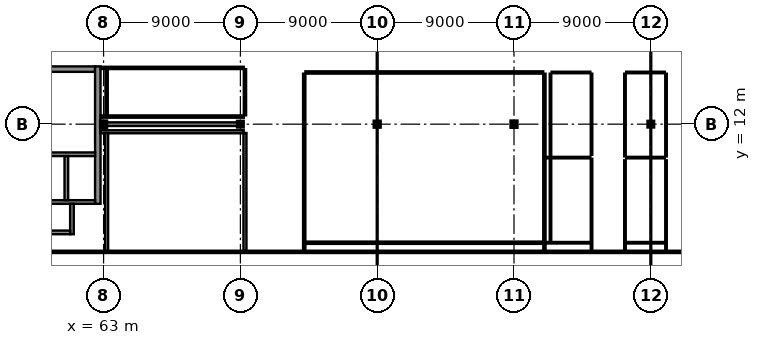
"""IFC4 building model, lengths in metres.
Left out: names, types, materials, properties, quantities, classifications, styles, units other than length and angle.
Written with IfcOpenShell. Run it as: python <this file> out.ifc"""

import sys

from ifc_helpers import new_model, si_unit, direction, frame, frame_2d, origin, origin_2d, place, context, subcontext, project, spatial, rectangle, i_section, extrude, element, fill, save


model = new_model("IFC4")
c1 = context("Model", 3, precision=1e-05, world=origin(), true_north=direction((0.0, 1.0)))
c2 = subcontext(c1, "Body", "Model", "MODEL_VIEW")
j1 = project(units=[si_unit("LENGTHUNIT", "METRE"), si_unit("PLANEANGLEUNIT", "RADIAN")], contexts=[c1])
p1 = place(None, origin())
s1 = spatial("IfcSite", under=j1, at=p1, CompositionType="ELEMENT")
p2 = place(p1, origin())
s2 = spatial("IfcBuilding", under=s1, at=p2, CompositionType="ELEMENT")
p3 = place(p2, frame((0.0, 0.0, 27.4)))
s3 = spatial("IfcBuildingStorey", under=s2, at=p3, CompositionType="ELEMENT", Elevation=27.4)
p4 = place(p3, frame((63.0, 12.0, 0.0), z_axis=(0.0, 0.0, 1.0), x_axis=(1.0, 0.0, 0.0)))
e1 = element("IfcColumn", 1, at=p4, inside=s3, PredefinedType="COLUMN", context=c2, shape_type="SweptSolid", body=[
    extrude(i_section(OverallWidth=0.3, OverallDepth=0.32, WebThickness=0.011, FlangeThickness=0.021, at=origin_2d()), origin(), (0.0, 0.0, 1.0), 4.0),
])
p5 = place(p3, frame((72.0, 12.0, 0.0), z_axis=(0.0, 0.0, 1.0), x_axis=(0.0, 1.0, 0.0)))
e2 = element("IfcColumn", 2, at=p5, inside=s3, PredefinedType="COLUMN", context=c2, shape_type="SweptSolid", body=[
    extrude(i_section(OverallWidth=0.28, OverallDepth=0.28, WebThickness=0.01, FlangeThickness=0.018, at=origin_2d()), origin(), (0.0, 0.0, 1.0), 4.0),
])
p6 = place(p3, frame((81.0, 12.0, 0.0), z_axis=(0.0, 0.0, 1.0), x_axis=(1.0, 0.0, 0.0)))
e3 = element("IfcColumn", 3, at=p6, inside=s3, PredefinedType="COLUMN", context=c2, shape_type="SweptSolid", body=[
    extrude(i_section(OverallWidth=0.3, OverallDepth=0.3, WebThickness=0.011, FlangeThickness=0.019, at=origin_2d()), origin(), (0.0, 0.0, 1.0), 4.0),
])
p7 = place(p3, frame((90.0, 12.0, 0.0), z_axis=(0.0, 0.0, 1.0), x_axis=(1.0, 0.0, 0.0)))
e4 = element("IfcColumn", 4, at=p7, inside=s3, PredefinedType="COLUMN", context=c2, shape_type="SweptSolid", body=[
    extrude(i_section(OverallWidth=0.3, OverallDepth=0.32, WebThickness=0.011, FlangeThickness=0.021, at=origin_2d()), origin(), (0.0, 0.0, 1.0), 4.0),
])
p8 = place(p3, frame((99.0, 12.0, 0.0), z_axis=(0.0, 0.0, 1.0), x_axis=(1.0, 0.0, 0.0)))
e5 = element("IfcColumn", 5, at=p8, inside=s3, PredefinedType="COLUMN", context=c2, shape_type="SweptSolid", body=[
    extrude(i_section(OverallWidth=0.28, OverallDepth=0.28, WebThickness=0.01, FlangeThickness=0.018, at=origin_2d()), origin(), (0.0, 0.0, 1.0), 4.0),
])
p9 = place(p3, frame((58.54, 15.62, 0.0), z_axis=(0.0, 0.0, 1.0), x_axis=(1.0, 0.0, 0.0)))
e6 = element("IfcWall", 6, at=p9, inside=s3, PredefinedType="SHEAR", context=c2, shape_type="SweptSolid", body=[
    extrude(rectangle(XDim=3.9, YDim=0.36, at=frame_2d((1.95, 0.0))), origin(), (0.0, 0.0, 1.0), 3.66),
])
p10 = place(p9, frame((1.15, 0.0, 0.0)))
e7 = element("IfcOpeningElement", 7, at=p10, cuts=e6, PredefinedType="OPENING", context=c2, shape_type="SweptSolid", body=[
    extrude(rectangle(XDim=1.6, YDim=2.25, at=frame_2d((0.8, 1.125))), frame((0.0, 0.195, 0.0), z_axis=(0.0, -1.0, 0.0), x_axis=(1.0, 0.0, 0.0)), (0.0, 0.0, 1.0), 0.39),
])
p11 = place(p3, frame((62.62, 6.76, 0.0), z_axis=(0.0, 0.0, 1.0), x_axis=(0.0, 1.0, 0.0)))
e8 = element("IfcWall", 8, at=p11, inside=s3, PredefinedType="SHEAR", context=c2, shape_type="SweptSolid", body=[
    extrude(rectangle(XDim=9.04, YDim=0.36, at=frame_2d((4.52, 0.0))), origin(), (0.0, 0.0, 1.0), 3.66),
])
p12 = place(p3, frame((58.54, 10.02, 0.0), z_axis=(0.0, 0.0, 1.0), x_axis=(1.0, 0.0, 0.0)))
e9 = element("IfcWall", 9, at=p12, inside=s3, PredefinedType="SHEAR", context=c2, shape_type="SweptSolid", body=[
    extrude(rectangle(XDim=3.9, YDim=0.24, at=frame_2d((1.95, 0.0))), origin(), (0.0, 0.0, 1.0), 3.81),
])
p13 = place(p12, frame((0.235, 0.0, 0.0)))
e10 = element("IfcOpeningElement", 10, at=p13, cuts=e9, PredefinedType="OPENING", context=c2, shape_type="SweptSolid", body=[
    extrude(rectangle(XDim=1.6, YDim=2.3, at=frame_2d((0.8, 1.15))), frame((0.0, 0.135, 0.0), z_axis=(0.0, -1.0, 0.0), x_axis=(1.0, 0.0, 0.0)), (0.0, 0.0, 1.0), 0.27),
])
p14 = place(p12, frame((2.185, 0.0, 0.0)))
e11 = element("IfcOpeningElement", 11, at=p14, cuts=e9, PredefinedType="OPENING", context=c2, shape_type="SweptSolid", body=[
    extrude(rectangle(XDim=1.6, YDim=2.3, at=frame_2d((0.8, 1.15))), frame((0.0, 0.135, 0.0), z_axis=(0.0, -1.0, 0.0), x_axis=(1.0, 0.0, 0.0)), (0.0, 0.0, 1.0), 0.27),
])
p15 = place(p3, frame((58.54, 6.88, 0.0), z_axis=(0.0, 0.0, 1.0), x_axis=(1.0, 0.0, 0.0)))
e12 = element("IfcWall", 12, at=p15, inside=s3, PredefinedType="SHEAR", context=c2, shape_type="SweptSolid", body=[
    extrude(rectangle(XDim=3.9, YDim=0.24, at=frame_2d((1.95, 0.0))), origin(), (0.0, 0.0, 1.0), 3.81),
])
p16 = place(p3, frame((60.55, 7.0, 0.0), z_axis=(0.0, 0.0, 1.0), x_axis=(0.0, 1.0, 0.0)))
e13 = element("IfcWall", 13, at=p16, inside=s3, PredefinedType="SHEAR", context=c2, shape_type="SweptSolid", body=[
    extrude(rectangle(XDim=2.9, YDim=0.24, at=frame_2d((1.45, 0.0))), origin(), (0.0, 0.0, 1.0), 3.81),
])
p17 = place(p3, frame((60.92, 4.76, 0.0), z_axis=(0.0, 0.0, 1.0), x_axis=(0.0, 1.0, 0.0)))
e14 = element("IfcWall", 14, at=p17, inside=s3, PredefinedType="SHEAR", context=c2, shape_type="SweptSolid", body=[
    extrude(rectangle(XDim=2.0, YDim=0.24, at=frame_2d((1.0, 0.0))), origin(), (0.0, 0.0, 1.0), 3.81),
])
p18 = place(p3, frame((58.54, 4.88, 0.0), z_axis=(0.0, 0.0, 1.0), x_axis=(1.0, 0.0, 0.0)))
e15 = element("IfcWall", 15, at=p18, inside=s3, PredefinedType="SHEAR", context=c2, shape_type="SweptSolid", body=[
    extrude(rectangle(XDim=2.26, YDim=0.24, at=frame_2d((1.13, 0.0))), origin(), (0.0, 0.0, 1.0), 3.81),
])
p19 = place(p3, frame((63.008, 12.0, 0.0), z_axis=(0.0, 0.0, 1.0), x_axis=(1.0, 0.0, 0.0)))
e16 = element("IfcWall", 16, at=p19, inside=s3, PredefinedType="SHEAR", context=c2, shape_type="SweptSolid", body=[
    extrude(rectangle(XDim=8.854, YDim=0.24, at=frame_2d((4.427, 0.0))), origin(), (0.0, 0.0, 1.0), 3.355),
])
p20 = place(p3, frame((45.88, 3.6, 0.0), z_axis=(0.0, 0.0, 1.0), x_axis=(1.0, 0.0, 0.0)))
e17 = element("IfcWall", 17, at=p20, inside=s3, PredefinedType="PARTITIONING", context=c2, shape_type="SweptSolid", body=[
    extrude(rectangle(XDim=58.24, YDim=0.15, at=frame_2d((29.12, 0.0))), origin(), (0.0, 0.0, 1.0), 3.64),
])
p21 = place(p20, frame((27.795, 0.0, 0.0)))
e18 = element("IfcOpeningElement", 18, at=p21, cuts=e17, PredefinedType="OPENING", context=c2, shape_type="SweptSolid", body=[
    extrude(rectangle(XDim=1.05, YDim=2.25, at=frame_2d((0.525, 1.125))), frame((0.0, 0.09, 0.0), z_axis=(0.0, -1.0, 0.0), x_axis=(1.0, 0.0, 0.0)), (0.0, 0.0, 1.0), 0.18),
])
p22 = place(p3, frame((62.795, 11.5, 0.0), z_axis=(0.0, 0.0, 1.0), x_axis=(1.0, 0.0, 0.0)))
e19 = element("IfcWall", 19, at=p22, inside=s3, PredefinedType="PARTITIONING", context=c2, shape_type="SweptSolid", body=[
    extrude(rectangle(XDim=9.425, YDim=0.2, at=frame_2d((4.712, 0.0))), origin(), (0.0, 0.0, 1.0), 3.64),
])
p23 = place(p3, frame((72.3, 11.42, 0.0), z_axis=(0.0, 0.0, 1.0), x_axis=(0.0, -1.0, 0.0)))
e20 = element("IfcWall", 20, at=p23, inside=s3, PredefinedType="PARTITIONING", context=c2, shape_type="SweptSolid", body=[
    extrude(rectangle(XDim=7.75, YDim=0.2, at=frame_2d((3.875, 0.0))), origin(), (0.0, 0.0, 1.0), 3.64),
])
p24 = place(p23, frame((3.025, 0.0, 0.0)))
e21 = element("IfcOpeningElement", 21, at=p24, cuts=e20, PredefinedType="OPENING", context=c2, shape_type="SweptSolid", body=[
    extrude(rectangle(XDim=1.7, YDim=2.4, at=frame_2d((0.85, 1.2))), frame((0.0, 0.115, 0.0), z_axis=(0.0, -1.0, 0.0), x_axis=(1.0, 0.0, 0.0)), (0.0, 0.0, 1.0), 0.23),
])
p25 = place(p3, frame((63.2, 3.67, 0.0), z_axis=(0.0, 0.0, 1.0), x_axis=(0.0, 1.0, 0.0)))
e22 = element("IfcWall", 22, at=p25, inside=s3, PredefinedType="PARTITIONING", context=c2, shape_type="SweptSolid", body=[
    extrude(rectangle(XDim=7.75, YDim=0.2, at=frame_2d((3.875, 0.0))), origin(), (0.0, 0.0, 1.0), 3.355),
])
p26 = place(p3, frame((72.22, 12.5, 0.0), z_axis=(0.0, 0.0, 1.0), x_axis=(-1.0, 0.0, 0.0)))
e23 = element("IfcWall", 23, at=p26, inside=s3, PredefinedType="PARTITIONING", context=c2, shape_type="SweptSolid", body=[
    extrude(rectangle(XDim=9.425, YDim=0.15, at=frame_2d((4.712, 0.0))), origin(), (0.0, 0.0, 1.0), 3.64),
])
p27 = place(p3, frame((63.2, 12.57, 0.0), z_axis=(0.0, 0.0, 1.0), x_axis=(0.0, 1.0, 0.0)))
e24 = element("IfcWall", 24, at=p27, inside=s3, PredefinedType="PARTITIONING", context=c2, shape_type="SweptSolid", body=[
    extrude(rectangle(XDim=3.05, YDim=0.15, at=frame_2d((1.525, 0.0))), origin(), (0.0, 0.0, 1.0), 3.355),
])
p28 = place(p3, frame((62.795, 15.7, 0.0), z_axis=(0.0, 0.0, 1.0), x_axis=(1.0, 0.0, 0.0)))
e25 = element("IfcWall", 25, at=p28, inside=s3, PredefinedType="PARTITIONING", context=c2, shape_type="SweptSolid", body=[
    extrude(rectangle(XDim=9.425, YDim=0.15, at=frame_2d((4.712, 0.0))), origin(), (0.0, 0.0, 1.0), 3.64),
])
p29 = place(p28, frame((4.187, 0.0, 0.0)))
e26 = element("IfcOpeningElement", 26, at=p29, cuts=e25, PredefinedType="OPENING", context=c2, shape_type="SweptSolid", body=[
    extrude(rectangle(XDim=1.05, YDim=2.25, at=frame_2d((0.525, 1.125))), frame((0.0, 0.09, 0.0), z_axis=(0.0, -1.0, 0.0), x_axis=(1.0, 0.0, 0.0)), (0.0, 0.0, 1.0), 0.18),
])
p30 = place(p3, frame((72.3, 15.62, 0.0), z_axis=(0.0, 0.0, 1.0), x_axis=(0.0, -1.0, 0.0)))
e27 = element("IfcWall", 27, at=p30, inside=s3, PredefinedType="PARTITIONING", context=c2, shape_type="SweptSolid", body=[
    extrude(rectangle(XDim=3.04, YDim=0.15, at=frame_2d((1.52, 0.0))), origin(), (0.0, 0.0, 1.0), 3.64),
])
p31 = place(p3, frame((76.2, 3.67, 0.0), z_axis=(0.0, 0.0, 1.0), x_axis=(0.0, 1.0, 0.0)))
e28 = element("IfcWall", 28, at=p31, inside=s3, PredefinedType="PARTITIONING", context=c2, shape_type="SweptSolid", body=[
    extrude(rectangle(XDim=11.65, YDim=0.15, at=frame_2d((5.825, 0.0))), origin(), (0.0, 0.0, 1.0), 3.64),
])
p32 = place(p3, frame((76.28, 15.4, 0.0), z_axis=(0.0, 0.0, 1.0), x_axis=(1.0, 0.0, 0.0)))
e29 = element("IfcWall", 29, at=p32, inside=s3, PredefinedType="PARTITIONING", context=c2, shape_type="SweptSolid", body=[
    extrude(rectangle(XDim=15.64, YDim=0.15, at=frame_2d((7.82, 0.0))), origin(), (0.0, 0.0, 1.0), 3.64),
])
p33 = place(p32, frame((7.295, 0.0, 0.0)))
e30 = element("IfcOpeningElement", 30, at=p33, cuts=e29, PredefinedType="OPENING", context=c2, shape_type="SweptSolid", body=[
    extrude(rectangle(XDim=1.05, YDim=2.25, at=frame_2d((0.525, 1.125))), frame((0.0, 0.09, 0.0), z_axis=(0.0, -1.0, 0.0), x_axis=(1.0, 0.0, 0.0)), (0.0, 0.0, 1.0), 0.18),
])
p34 = place(p3, frame((92.0, 15.32, 0.0), z_axis=(0.0, 0.0, 1.0), x_axis=(0.0, -1.0, 0.0)))
e31 = element("IfcWall", 31, at=p34, inside=s3, PredefinedType="PARTITIONING", context=c2, shape_type="SweptSolid", body=[
    extrude(rectangle(XDim=11.65, YDim=0.15, at=frame_2d((5.825, 0.0))), origin(), (0.0, 0.0, 1.0), 3.64),
])
p35 = place(p3, frame((91.93, 4.2, 0.0), z_axis=(0.0, 0.0, 1.0), x_axis=(-1.0, 0.0, 0.0)))
e32 = element("IfcWall", 32, at=p35, inside=s3, PredefinedType="PARTITIONING", context=c2, shape_type="SweptSolid", body=[
    extrude(rectangle(XDim=15.66, YDim=0.15, at=frame_2d((7.83, 0.0))), origin(), (0.0, 0.0, 1.0), 3.64),
])
p36 = place(p3, frame((95.1, 9.72, 0.0), z_axis=(0.0, 0.0, 1.0), x_axis=(0.0, -1.0, 0.0)))
e33 = element("IfcWall", 33, at=p36, inside=s3, PredefinedType="PARTITIONING", context=c2, shape_type="SweptSolid", body=[
    extrude(rectangle(XDim=6.05, YDim=0.1, at=frame_2d((3.025, 0.0))), origin(), (0.0, 0.0, 1.0), 3.64),
])
p37 = place(p36, frame((2.529, 0.0, 0.0)))
e34 = element("IfcOpeningElement", 34, at=p37, cuts=e33, PredefinedType="OPENING", context=c2, shape_type="SweptSolid", body=[
    extrude(rectangle(XDim=0.9, YDim=2.05, at=frame_2d((0.45, 1.025))), frame((0.0, 0.065, 0.0), z_axis=(0.0, -1.0, 0.0), x_axis=(1.0, 0.0, 0.0)), (0.0, 0.0, 1.0), 0.13),
])
p38 = place(p3, frame((95.055, 4.2, 0.0), z_axis=(0.0, 0.0, 1.0), x_axis=(-1.0, 0.0, 0.0)))
e35 = element("IfcWall", 35, at=p38, inside=s3, PredefinedType="PARTITIONING", context=c2, shape_type="SweptSolid", body=[
    extrude(rectangle(XDim=2.985, YDim=0.1, at=frame_2d((1.492, 0.0))), origin(), (0.0, 0.0, 1.0), 3.64),
])
p39 = place(p3, frame((92.4, 4.245, 0.0), z_axis=(0.0, 0.0, 1.0), x_axis=(0.0, 1.0, 0.0)))
e36 = element("IfcWall", 36, at=p39, inside=s3, PredefinedType="PARTITIONING", context=c2, shape_type="SweptSolid", body=[
    extrude(rectangle(XDim=5.475, YDim=0.1, at=frame_2d((2.737, 0.0))), origin(), (0.0, 0.0, 1.0), 3.64),
])
p40 = place(p3, frame((92.07, 9.8, 0.0), z_axis=(0.0, 0.0, 1.0), x_axis=(1.0, 0.0, 0.0)))
e37 = element("IfcWall", 37, at=p40, inside=s3, PredefinedType="PARTITIONING", context=c2, shape_type="SweptSolid", body=[
    extrude(rectangle(XDim=2.95, YDim=0.1, at=frame_2d((1.475, 0.0))), origin(), (0.0, 0.0, 1.0), 3.64),
])
p41 = place(p3, frame((92.4, 9.845, 0.0), z_axis=(0.0, 0.0, 1.0), x_axis=(0.0, 1.0, 0.0)))
e38 = element("IfcWall", 38, at=p41, inside=s3, PredefinedType="PARTITIONING", context=c2, shape_type="SweptSolid", body=[
    extrude(rectangle(XDim=5.475, YDim=0.1, at=frame_2d((2.738, 0.0))), origin(), (0.0, 0.0, 1.0), 3.64),
])
p42 = place(p3, frame((92.48, 15.4, 0.0), z_axis=(0.0, 0.0, 1.0), x_axis=(1.0, 0.0, 0.0)))
e39 = element("IfcWall", 39, at=p42, inside=s3, PredefinedType="PARTITIONING", context=c2, shape_type="SweptSolid", body=[
    extrude(rectangle(XDim=2.54, YDim=0.1, at=frame_2d((1.27, 0.0))), origin(), (0.0, 0.0, 1.0), 3.64),
])
p43 = place(p3, frame((95.1, 15.32, 0.0), z_axis=(0.0, 0.0, 1.0), x_axis=(0.0, -1.0, 0.0)))
e40 = element("IfcWall", 40, at=p43, inside=s3, PredefinedType="PARTITIONING", context=c2, shape_type="SweptSolid", body=[
    extrude(rectangle(XDim=5.34, YDim=0.1, at=frame_2d((2.67, 0.0))), origin(), (0.0, 0.0, 1.0), 3.64),
])
p44 = place(p43, frame((2.22, 0.0, 0.0)))
e41 = element("IfcOpeningElement", 41, at=p44, cuts=e40, PredefinedType="OPENING", context=c2, shape_type="SweptSolid", body=[
    extrude(rectangle(XDim=0.9, YDim=2.05, at=frame_2d((0.45, 1.025))), frame((0.0, 0.065, 0.0), z_axis=(0.0, -1.0, 0.0), x_axis=(1.0, 0.0, 0.0)), (0.0, 0.0, 1.0), 0.13),
])
p45 = place(p3, frame((97.3, 9.88, 0.0), z_axis=(0.0, 0.0, 1.0), x_axis=(0.0, 1.0, 0.0)))
e42 = element("IfcWall", 42, at=p45, inside=s3, PredefinedType="PARTITIONING", context=c2, shape_type="SweptSolid", body=[
    extrude(rectangle(XDim=5.44, YDim=0.1, at=frame_2d((2.72, 0.0))), origin(), (0.0, 0.0, 1.0), 3.64),
])
p46 = place(p45, frame((2.22, 0.0, 0.0)))
e43 = element("IfcOpeningElement", 43, at=p46, cuts=e42, PredefinedType="OPENING", context=c2, shape_type="SweptSolid", body=[
    extrude(rectangle(XDim=1.0, YDim=2.1, at=frame_2d((0.5, 1.05))), frame((0.0, 0.065, 0.0), z_axis=(0.0, -1.0, 0.0), x_axis=(1.0, 0.0, 0.0)), (0.0, 0.0, 1.0), 0.13),
])
p47 = place(p3, frame((97.38, 15.4, 0.0), z_axis=(0.0, 0.0, 1.0), x_axis=(1.0, 0.0, 0.0)))
e44 = element("IfcWall", 44, at=p47, inside=s3, PredefinedType="PARTITIONING", context=c2, shape_type="SweptSolid", body=[
    extrude(rectangle(XDim=2.54, YDim=0.1, at=frame_2d((1.27, 0.0))), origin(), (0.0, 0.0, 1.0), 3.64),
])
p48 = place(p3, frame((100.0, 15.32, 0.0), z_axis=(0.0, 0.0, 1.0), x_axis=(0.0, -1.0, 0.0)))
e45 = element("IfcWall", 45, at=p48, inside=s3, PredefinedType="PARTITIONING", context=c2, shape_type="SweptSolid", body=[
    extrude(rectangle(XDim=5.44, YDim=0.1, at=frame_2d((2.72, 0.0))), origin(), (0.0, 0.0, 1.0), 3.64),
])
p49 = place(p3, frame((99.92, 9.8, 0.0), z_axis=(0.0, 0.0, 1.0), x_axis=(-1.0, 0.0, 0.0)))
e46 = element("IfcWall", 46, at=p49, inside=s3, PredefinedType="PARTITIONING", context=c2, shape_type="SweptSolid", body=[
    extrude(rectangle(XDim=2.54, YDim=0.1, at=frame_2d((1.27, 0.0))), origin(), (0.0, 0.0, 1.0), 3.64),
])
p50 = place(p3, frame((100.0, 9.62, 0.0), z_axis=(0.0, 0.0, 1.0), x_axis=(0.0, -1.0, 0.0)))
e47 = element("IfcWall", 47, at=p50, inside=s3, PredefinedType="PARTITIONING", context=c2, shape_type="SweptSolid", body=[
    extrude(rectangle(XDim=5.95, YDim=0.1, at=frame_2d((2.975, 0.0))), origin(), (0.0, 0.0, 1.0), 3.64),
])
p51 = place(p3, frame((99.955, 4.2, 0.0), z_axis=(0.0, 0.0, 1.0), x_axis=(-1.0, 0.0, 0.0)))
e48 = element("IfcWall", 48, at=p51, inside=s3, PredefinedType="PARTITIONING", context=c2, shape_type="SweptSolid", body=[
    extrude(rectangle(XDim=2.575, YDim=0.1, at=frame_2d((1.288, 0.0))), origin(), (0.0, 0.0, 1.0), 3.64),
])
p52 = place(p3, frame((97.3, 3.67, 0.0), z_axis=(0.0, 0.0, 1.0), x_axis=(0.0, 1.0, 0.0)))
e49 = element("IfcWall", 49, at=p52, inside=s3, PredefinedType="PARTITIONING", context=c2, shape_type="SweptSolid", body=[
    extrude(rectangle(XDim=5.95, YDim=0.1, at=frame_2d((2.975, 0.0))), origin(), (0.0, 0.0, 1.0), 3.64),
])
p53 = place(p52, frame((2.571, 0.0, 0.0)))
e50 = element("IfcOpeningElement", 50, at=p53, cuts=e49, PredefinedType="OPENING", context=c2, shape_type="SweptSolid", body=[
    extrude(rectangle(XDim=0.9, YDim=2.05, at=frame_2d((0.45, 1.025))), frame((0.0, 0.065, 0.0), z_axis=(0.0, -1.0, 0.0), x_axis=(1.0, 0.0, 0.0)), (0.0, 0.0, 1.0), 0.13),
])
p54 = place(p10, origin())
e51 = element("IfcDoor", 51, at=p54, inside=s3, OperationType="DOUBLE_DOOR_SINGLE_SWING", PredefinedType="DOOR", context=c2, shape_type="SweptSolid", body=[
    extrude(rectangle(XDim=1.6, YDim=2.25, at=frame_2d((0.8, 1.125))), frame((0.0, 0.025, 0.0), z_axis=(0.0, -1.0, 0.0), x_axis=(1.0, 0.0, 0.0)), (0.0, 0.0, 1.0), 0.05),
])
fill(e7, e51)
p55 = place(p13, origin())
e52 = element("IfcDoor", 52, at=p55, inside=s3, OperationType="DOUBLE_DOOR_SLIDING", PredefinedType="DOOR", context=c2, shape_type="SweptSolid", body=[
    extrude(rectangle(XDim=1.6, YDim=2.3, at=frame_2d((0.8, 1.15))), frame((0.0, 0.025, 0.0), z_axis=(0.0, -1.0, 0.0), x_axis=(1.0, 0.0, 0.0)), (0.0, 0.0, 1.0), 0.05),
])
fill(e10, e52)
p56 = place(p14, origin())
e53 = element("IfcDoor", 53, at=p56, inside=s3, OperationType="DOUBLE_DOOR_SLIDING", PredefinedType="DOOR", context=c2, shape_type="SweptSolid", body=[
    extrude(rectangle(XDim=1.6, YDim=2.3, at=frame_2d((0.8, 1.15))), frame((0.0, 0.025, 0.0), z_axis=(0.0, -1.0, 0.0), x_axis=(1.0, 0.0, 0.0)), (0.0, 0.0, 1.0), 0.05),
])
fill(e11, e53)
p57 = place(p21, frame((1.05, 0.0, 0.0), z_axis=(0.0, 0.0, 1.0), x_axis=(-1.0, 0.0, 0.0)))
e54 = element("IfcDoor", 54, at=p57, inside=s3, OperationType="SINGLE_SWING_LEFT", PredefinedType="DOOR", context=c2, shape_type="SweptSolid", body=[
    extrude(rectangle(XDim=1.05, YDim=2.25, at=frame_2d((0.525, 1.125))), frame((0.0, 0.025, 0.0), z_axis=(0.0, -1.0, 0.0), x_axis=(1.0, 0.0, 0.0)), (0.0, 0.0, 1.0), 0.05),
])
fill(e18, e54)
p58 = place(p24, frame((1.7, 0.0, 0.0), z_axis=(0.0, 0.0, 1.0), x_axis=(-1.0, 0.0, 0.0)))
e55 = element("IfcDoor", 55, at=p58, inside=s3, OperationType="DOUBLE_DOOR_SINGLE_SWING", PredefinedType="DOOR", context=c2, shape_type="SweptSolid", body=[
    extrude(rectangle(XDim=1.7, YDim=2.4, at=frame_2d((0.85, 1.2))), frame((0.0, 0.025, 0.0), z_axis=(0.0, -1.0, 0.0), x_axis=(1.0, 0.0, 0.0)), (0.0, 0.0, 1.0), 0.05),
])
fill(e21, e55)
p59 = place(p29, origin())
e56 = element("IfcDoor", 56, at=p59, inside=s3, OperationType="SINGLE_SWING_LEFT", PredefinedType="DOOR", context=c2, shape_type="SweptSolid", body=[
    extrude(rectangle(XDim=1.05, YDim=2.25, at=frame_2d((0.525, 1.125))), frame((0.0, 0.025, 0.0), z_axis=(0.0, -1.0, 0.0), x_axis=(1.0, 0.0, 0.0)), (0.0, 0.0, 1.0), 0.05),
])
fill(e26, e56)
p60 = place(p33, origin())
e57 = element("IfcDoor", 57, at=p60, inside=s3, OperationType="SINGLE_SWING_LEFT", PredefinedType="DOOR", context=c2, shape_type="SweptSolid", body=[
    extrude(rectangle(XDim=1.05, YDim=2.25, at=frame_2d((0.525, 1.125))), frame((0.0, 0.025, 0.0), z_axis=(0.0, -1.0, 0.0), x_axis=(1.0, 0.0, 0.0)), (0.0, 0.0, 1.0), 0.05),
])
fill(e30, e57)
p61 = place(p37, frame((0.9, 0.0, 0.0), z_axis=(0.0, 0.0, 1.0), x_axis=(-1.0, 0.0, 0.0)))
e58 = element("IfcDoor", 58, at=p61, inside=s3, OperationType="SINGLE_SWING_RIGHT", PredefinedType="DOOR", context=c2, shape_type="SweptSolid", body=[
    extrude(rectangle(XDim=0.9, YDim=2.05, at=frame_2d((0.45, 1.025))), frame((0.0, 0.025, 0.0), z_axis=(0.0, -1.0, 0.0), x_axis=(1.0, 0.0, 0.0)), (0.0, 0.0, 1.0), 0.05),
])
fill(e34, e58)
p62 = place(p44, origin())
e59 = element("IfcDoor", 59, at=p62, inside=s3, OperationType="SINGLE_SWING_LEFT", PredefinedType="DOOR", context=c2, shape_type="SweptSolid", body=[
    extrude(rectangle(XDim=0.9, YDim=2.05, at=frame_2d((0.45, 1.025))), frame((0.0, 0.025, 0.0), z_axis=(0.0, -1.0, 0.0), x_axis=(1.0, 0.0, 0.0)), (0.0, 0.0, 1.0), 0.05),
])
fill(e41, e59)
p63 = place(p46, frame((1.0, 0.0, 0.0), z_axis=(0.0, 0.0, 1.0), x_axis=(-1.0, 0.0, 0.0)))
e60 = element("IfcDoor", 60, at=p63, inside=s3, OperationType="SINGLE_SWING_RIGHT", PredefinedType="DOOR", context=c2, shape_type="SweptSolid", body=[
    extrude(rectangle(XDim=1.0, YDim=2.1, at=frame_2d((0.5, 1.05))), frame((0.0, 0.025, 0.0), z_axis=(0.0, -1.0, 0.0), x_axis=(1.0, 0.0, 0.0)), (0.0, 0.0, 1.0), 0.05),
])
fill(e43, e60)
p64 = place(p53, origin())
e61 = element("IfcDoor", 61, at=p64, inside=s3, OperationType="SINGLE_SWING_LEFT", PredefinedType="DOOR", context=c2, shape_type="SweptSolid", body=[
    extrude(rectangle(XDim=0.9, YDim=2.05, at=frame_2d((0.45, 1.025))), frame((0.0, 0.025, 0.0), z_axis=(0.0, -1.0, 0.0), x_axis=(1.0, 0.0, 0.0)), (0.0, 0.0, 1.0), 0.05),
])
fill(e50, e61)
save(model, sys.argv[1])
